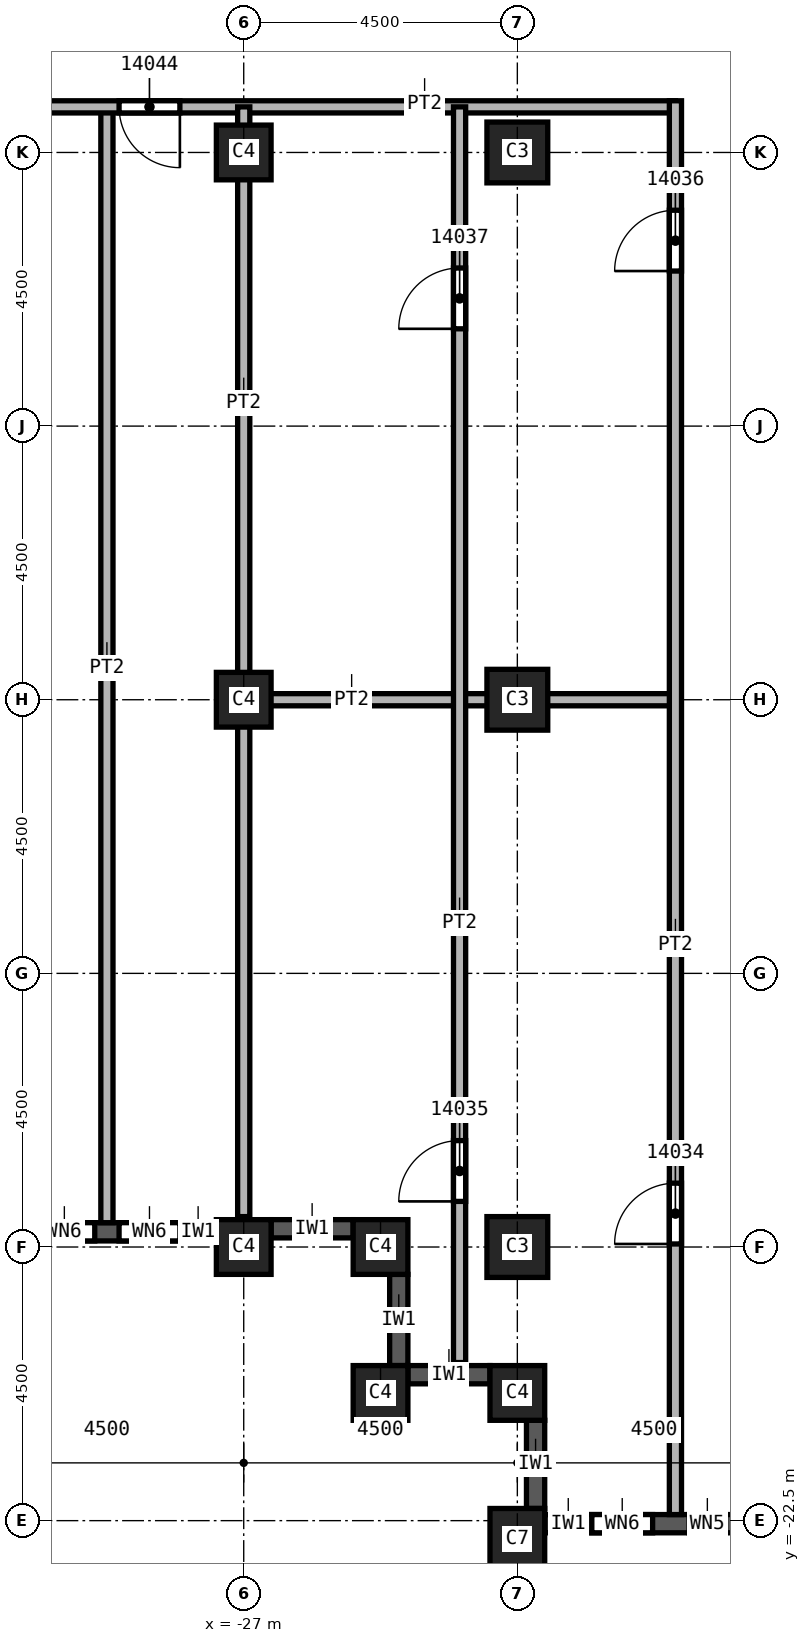
"""IFC4 building model, lengths in metres.
Left out: names, types, materials, properties, quantities, classifications, styles, units other than length and angle.
Written with IfcOpenShell. Run it as: python <this file> out.ifc"""

import sys

from ifc_helpers import new_model, si_unit, direction, frame, frame_2d, origin, origin_2d, place, context, subcontext, project, spatial, rectangle, extrude, element, fill, save


model = new_model("IFC4")
c1 = context("Model", 3, precision=1e-05, world=origin(), true_north=direction((0.0, 1.0)))
c2 = subcontext(c1, "Body", "Model", "MODEL_VIEW")
j1 = project(units=[si_unit("LENGTHUNIT", "METRE"), si_unit("PLANEANGLEUNIT", "RADIAN")], contexts=[c1])
p1 = place(None, origin())
s1 = spatial("IfcSite", under=j1, at=p1, CompositionType="ELEMENT")
p2 = place(p1, origin())
s2 = spatial("IfcBuilding", under=s1, at=p2, CompositionType="ELEMENT")
p3 = place(p2, frame((0.0, 0.0, 220.0)))
s3 = spatial("IfcBuildingStorey", under=s2, at=p3, CompositionType="ELEMENT", Elevation=220.0)
for number, where, z_axis, x_axis in (
    (1, (-22.5, 0.0, 0.0), (0.0, 0.0, 1.0), (1.0, 0.0, 0.0)),
    (2, (-22.5, -9.0, 0.0), (0.0, 0.0, 1.0), (1.0, 0.0, 0.0)),
    (3, (-22.5, -18.0, 0.0), (0.0, 0.0, 1.0), (1.0, 0.0, 0.0)),
):
    element("IfcColumn", number, at=place(p3, frame(where, z_axis=z_axis, x_axis=x_axis)), inside=s3, PredefinedType="COLUMN", context=c2, shape_type="SweptSolid", body=[
        extrude(rectangle(XDim=1.0, YDim=1.0, at=origin_2d()), origin(), (0.0, 0.0, 1.0), 3.72),
    ])
p4 = place(p3, frame((-22.5, -22.8, 0.0), z_axis=(0.0, 0.0, 1.0), x_axis=(1.0, 0.0, 0.0)))
e4 = element("IfcColumn", 4, at=p4, inside=s3, PredefinedType="COLUMN", context=c2, shape_type="SweptSolid", body=[
    extrude(rectangle(XDim=0.9, YDim=1.0, at=origin_2d()), origin(), (0.0, 0.0, 1.0), 3.72),
])
for number, where, z_axis, x_axis in (
    (5, (-27.0, 0.0, 0.0), (0.0, 0.0, 1.0), (1.0, 0.0, 0.0)),
    (6, (-27.0, -9.0, 0.0), (0.0, 0.0, 1.0), (1.0, 0.0, 0.0)),
    (7, (-27.0, -18.0, 0.0), (0.0, 0.0, 1.0), (1.0, 0.0, 0.0)),
    (8, (-22.5, -20.4, 0.0), (0.0, 0.0, 1.0), (1.0, 0.0, 0.0)),
    (9, (-24.75, -20.4, 0.0), (0.0, 0.0, 1.0), (1.0, 0.0, 0.0)),
    (10, (-24.75, -18.0, 0.0), (0.0, 0.0, 1.0), (1.0, 0.0, 0.0)),
):
    element("IfcColumn", number, at=place(p3, frame(where, z_axis=z_axis, x_axis=x_axis)), inside=s3, PredefinedType="COLUMN", context=c2, shape_type="SweptSolid", body=[
        extrude(rectangle(XDim=0.9, YDim=0.9, at=origin_2d()), origin(), (0.0, 0.0, 1.0), 3.72),
    ])
p5 = place(p3, frame((-31.05, -17.75, 0.0), z_axis=(0.0, 0.0, 1.0), x_axis=(1.0, 0.0, 0.0)))
e11 = element("IfcWall", 11, at=p5, inside=s3, PredefinedType="SOLIDWALL", context=c2, shape_type="SweptSolid", body=[
    extrude(rectangle(XDim=3.6, YDim=0.3, at=frame_2d((1.8, 0.0))), origin(), (0.0, 0.0, 1.0), 3.12),
])
p6 = place(p5, frame((0.6, 0.0, 0.8)))
e12 = element("IfcOpeningElement", 12, at=p6, cuts=e11, PredefinedType="OPENING", context=c2, shape_type="SweptSolid", body=[
    extrude(rectangle(XDim=1.0, YDim=1.95, at=frame_2d((0.5, 0.975))), frame((0.0, 0.15, 0.0), z_axis=(0.0, -1.0, 0.0), x_axis=(1.0, 0.0, 0.0)), (0.0, 0.0, 1.0), 0.3),
])
p7 = place(p5, frame((2.0, 0.0, 0.8)))
e13 = element("IfcOpeningElement", 13, at=p7, cuts=e11, PredefinedType="OPENING", context=c2, shape_type="SweptSolid", body=[
    extrude(rectangle(XDim=1.0, YDim=1.95, at=frame_2d((0.5, 0.975))), frame((0.0, 0.15, 0.0), z_axis=(0.0, -1.0, 0.0), x_axis=(1.0, 0.0, 0.0)), (0.0, 0.0, 1.0), 0.3),
])
p8 = place(p3, frame((-26.55, -17.7, 0.0), z_axis=(0.0, 0.0, 1.0), x_axis=(1.0, 0.0, 0.0)))
e14 = element("IfcWall", 14, at=p8, inside=s3, PredefinedType="SOLIDWALL", context=c2, shape_type="SweptSolid", body=[
    extrude(rectangle(XDim=1.35, YDim=0.3, at=frame_2d((0.675, 0.0))), origin(), (0.0, 0.0, 1.0), 3.12),
])
p9 = place(p3, frame((-24.45, -18.45, 0.0), z_axis=(0.0, 0.0, 1.0), x_axis=(0.0, -1.0, 0.0)))
e15 = element("IfcWall", 15, at=p9, inside=s3, PredefinedType="SOLIDWALL", context=c2, shape_type="SweptSolid", body=[
    extrude(rectangle(XDim=1.5, YDim=0.3, at=frame_2d((0.75, 0.0))), origin(), (0.0, 0.0, 1.0), 3.12),
])
p10 = place(p3, frame((-24.3, -20.1, 0.0), z_axis=(0.0, 0.0, 1.0), x_axis=(1.0, 0.0, 0.0)))
e16 = element("IfcWall", 16, at=p10, inside=s3, PredefinedType="SOLIDWALL", context=c2, shape_type="SweptSolid", body=[
    extrude(rectangle(XDim=1.35, YDim=0.3, at=frame_2d((0.675, 0.0))), origin(), (0.0, 0.0, 1.0), 3.12),
])
p11 = place(p3, frame((-22.2, -20.85, 0.0), z_axis=(0.0, 0.0, 1.0), x_axis=(0.0, -1.0, 0.0)))
e17 = element("IfcWall", 17, at=p11, inside=s3, PredefinedType="SOLIDWALL", context=c2, shape_type="SweptSolid", body=[
    extrude(rectangle(XDim=1.45, YDim=0.3, at=frame_2d((0.725, 0.0))), origin(), (0.0, 0.0, 1.0), 3.12),
])
p12 = place(p3, frame((-22.05, -22.55, 0.0), z_axis=(0.0, 0.0, 1.0), x_axis=(1.0, 0.0, 0.0)))
e18 = element("IfcWall", 18, at=p12, inside=s3, PredefinedType="SOLIDWALL", context=c2, shape_type="SweptSolid", body=[
    extrude(rectangle(XDim=3.6, YDim=0.3, at=frame_2d((1.8, 0.0))), origin(), (0.0, 0.0, 1.0), 3.12),
])
p13 = place(p12, frame((0.775, 0.0, 0.8)))
e19 = element("IfcOpeningElement", 19, at=p13, cuts=e18, PredefinedType="OPENING", context=c2, shape_type="SweptSolid", body=[
    extrude(rectangle(XDim=1.0, YDim=1.95, at=frame_2d((0.5, 0.975))), frame((0.0, 0.15, 0.0), z_axis=(0.0, -1.0, 0.0), x_axis=(1.0, 0.0, 0.0)), (0.0, 0.0, 1.0), 0.3),
])
p14 = place(p12, frame((2.375, 0.0, 0.8)))
e20 = element("IfcOpeningElement", 20, at=p14, cuts=e18, PredefinedType="OPENING", context=c2, shape_type="SweptSolid", body=[
    extrude(rectangle(XDim=0.6, YDim=1.95, at=frame_2d((0.3, 0.975))), frame((0.0, 0.15, 0.0), z_axis=(0.0, -1.0, 0.0), x_axis=(1.0, 0.0, 0.0)), (0.0, 0.0, 1.0), 0.3),
])
p15 = place(p3, frame((-29.25, 0.75, 0.0), z_axis=(0.0, 0.0, 1.0), x_axis=(0.0, -1.0, 0.0)))
e21 = element("IfcWall", 21, at=p15, inside=s3, PredefinedType="PARTITIONING", context=c2, shape_type="SweptSolid", body=[
    extrude(rectangle(XDim=18.35, YDim=0.2, at=frame_2d((9.175, 0.0))), origin(), (0.0, 0.0, 1.0), 3.72),
])
p16 = place(p3, frame((-19.9, 0.75, 0.0), z_axis=(0.0, 0.0, 1.0), x_axis=(-1.0, 0.0, 0.0)))
e22 = element("IfcWall", 22, at=p16, inside=s3, PredefinedType="PARTITIONING", context=c2, shape_type="SweptSolid", body=[
    extrude(rectangle(XDim=13.95, YDim=0.2, at=frame_2d((6.975, 0.0))), origin(), (0.0, 0.0, 1.0), 3.72),
])
p17 = place(p16, frame((8.15, 0.0, 0.0)))
e23 = element("IfcOpeningElement", 23, at=p17, cuts=e22, PredefinedType="OPENING", context=c2, shape_type="SweptSolid", body=[
    extrude(rectangle(XDim=1.0, YDim=2.1, at=frame_2d((0.5, 1.05))), frame((0.0, 0.1, 0.0), z_axis=(0.0, -1.0, 0.0), x_axis=(1.0, 0.0, 0.0)), (0.0, 0.0, 1.0), 0.2),
])
p18 = place(p3, frame((-27.1, -9.0, 0.0), z_axis=(0.0, 0.0, 1.0), x_axis=(1.0, 0.0, 0.0)))
e24 = element("IfcWall", 24, at=p18, inside=s3, PredefinedType="PARTITIONING", context=c2, shape_type="SweptSolid", body=[
    extrude(rectangle(XDim=7.2, YDim=0.2, at=frame_2d((3.6, 0.0))), origin(), (0.0, 0.0, 1.0), 3.72),
])
p19 = place(p3, frame((-27.0, -17.5, 0.0), z_axis=(0.0, 0.0, 1.0), x_axis=(0.0, 1.0, 0.0)))
e25 = element("IfcWall", 25, at=p19, inside=s3, PredefinedType="PARTITIONING", context=c2, shape_type="SweptSolid", body=[
    extrude(rectangle(XDim=18.25, YDim=0.2, at=frame_2d((9.125, 0.0))), origin(), (0.0, 0.0, 1.0), 3.72),
])
p20 = place(p3, frame((-23.45, -19.9, 0.0), z_axis=(0.0, 0.0, 1.0), x_axis=(0.0, 1.0, 0.0)))
e26 = element("IfcWall", 26, at=p20, inside=s3, PredefinedType="PARTITIONING", context=c2, shape_type="SweptSolid", body=[
    extrude(rectangle(XDim=20.65, YDim=0.2, at=frame_2d((10.325, 0.0))), origin(), (0.0, 0.0, 1.0), 3.72),
])
p21 = place(p20, frame((2.65, 0.0, 0.0)))
e27 = element("IfcOpeningElement", 27, at=p21, cuts=e26, PredefinedType="OPENING", context=c2, shape_type="SweptSolid", body=[
    extrude(rectangle(XDim=1.0, YDim=2.1, at=frame_2d((0.5, 1.05))), frame((0.0, 0.1, 0.0), z_axis=(0.0, -1.0, 0.0), x_axis=(1.0, 0.0, 0.0)), (0.0, 0.0, 1.0), 0.2),
])
p22 = place(p20, frame((17.0, 0.0, 0.0)))
e28 = element("IfcOpeningElement", 28, at=p22, cuts=e26, PredefinedType="OPENING", context=c2, shape_type="SweptSolid", body=[
    extrude(rectangle(XDim=1.0, YDim=2.1, at=frame_2d((0.5, 1.05))), frame((0.0, 0.1, 0.0), z_axis=(0.0, -1.0, 0.0), x_axis=(1.0, 0.0, 0.0)), (0.0, 0.0, 1.0), 0.2),
])
p23 = place(p3, frame((-19.9, -22.4, 0.0), z_axis=(0.0, 0.0, 1.0), x_axis=(0.0, 1.0, 0.0)))
e29 = element("IfcWall", 29, at=p23, inside=s3, PredefinedType="PARTITIONING", context=c2, shape_type="SweptSolid", body=[
    extrude(rectangle(XDim=23.25, YDim=0.2, at=frame_2d((11.625, 0.0))), origin(), (0.0, 0.0, 1.0), 3.72),
])
p24 = place(p23, frame((4.45, 0.0, 0.0)))
e30 = element("IfcOpeningElement", 30, at=p24, cuts=e29, PredefinedType="OPENING", context=c2, shape_type="SweptSolid", body=[
    extrude(rectangle(XDim=1.0, YDim=2.1, at=frame_2d((0.5, 1.05))), frame((0.0, 0.1, 0.0), z_axis=(0.0, -1.0, 0.0), x_axis=(1.0, 0.0, 0.0)), (0.0, 0.0, 1.0), 0.2),
])
p25 = place(p23, frame((20.45, 0.0, 0.0)))
e31 = element("IfcOpeningElement", 31, at=p25, cuts=e29, PredefinedType="OPENING", context=c2, shape_type="SweptSolid", body=[
    extrude(rectangle(XDim=1.0, YDim=2.1, at=frame_2d((0.5, 1.05))), frame((0.0, 0.1, 0.0), z_axis=(0.0, -1.0, 0.0), x_axis=(1.0, 0.0, 0.0)), (0.0, 0.0, 1.0), 0.2),
])
p26 = place(p24, origin())
e32 = element("IfcDoor", 32, at=p26, inside=s3, OperationType="SINGLE_SWING_LEFT", PredefinedType="DOOR", context=c2, shape_type="SweptSolid", body=[
    extrude(rectangle(XDim=1.0, YDim=2.1, at=frame_2d((0.5, 1.05))), frame((0.0, 0.025, 0.0), z_axis=(0.0, -1.0, 0.0), x_axis=(1.0, 0.0, 0.0)), (0.0, 0.0, 1.0), 0.05),
])
fill(e30, e32)
p27 = place(p21, origin())
e33 = element("IfcDoor", 33, at=p27, inside=s3, OperationType="SINGLE_SWING_RIGHT", PredefinedType="DOOR", context=c2, shape_type="SweptSolid", body=[
    extrude(rectangle(XDim=1.0, YDim=2.1, at=frame_2d((0.5, 1.05))), frame((0.0, 0.025, 0.0), z_axis=(0.0, -1.0, 0.0), x_axis=(1.0, 0.0, 0.0)), (0.0, 0.0, 1.0), 0.05),
])
fill(e27, e33)
p28 = place(p25, origin())
e34 = element("IfcDoor", 34, at=p28, inside=s3, OperationType="SINGLE_SWING_LEFT", PredefinedType="DOOR", context=c2, shape_type="SweptSolid", body=[
    extrude(rectangle(XDim=1.0, YDim=2.1, at=frame_2d((0.5, 1.05))), frame((0.0, 0.025, 0.0), z_axis=(0.0, -1.0, 0.0), x_axis=(1.0, 0.0, 0.0)), (0.0, 0.0, 1.0), 0.05),
])
fill(e31, e34)
p29 = place(p22, origin())
e35 = element("IfcDoor", 35, at=p29, inside=s3, OperationType="SINGLE_SWING_RIGHT", PredefinedType="DOOR", context=c2, shape_type="SweptSolid", body=[
    extrude(rectangle(XDim=1.0, YDim=2.1, at=frame_2d((0.5, 1.05))), frame((0.0, 0.025, 0.0), z_axis=(0.0, -1.0, 0.0), x_axis=(1.0, 0.0, 0.0)), (0.0, 0.0, 1.0), 0.05),
])
fill(e28, e35)
p30 = place(p17, origin())
e36 = element("IfcDoor", 36, at=p30, inside=s3, OperationType="SINGLE_SWING_LEFT", PredefinedType="DOOR", context=c2, shape_type="SweptSolid", body=[
    extrude(rectangle(XDim=1.0, YDim=2.1, at=frame_2d((0.5, 1.05))), frame((0.0, 0.025, 0.0), z_axis=(0.0, -1.0, 0.0), x_axis=(1.0, 0.0, 0.0)), (0.0, 0.0, 1.0), 0.05),
])
fill(e23, e36)
p31 = place(p6, origin())
e37 = element("IfcWindow", 37, at=p31, inside=s3, PartitioningType="SINGLE_PANEL", PredefinedType="WINDOW", context=c2, shape_type="SweptSolid", body=[
    extrude(rectangle(XDim=1.0, YDim=1.95, at=frame_2d((0.5, 0.975))), frame((0.0, 0.03, 0.0), z_axis=(0.0, -1.0, 0.0), x_axis=(1.0, 0.0, 0.0)), (0.0, 0.0, 1.0), 0.06),
])
fill(e12, e37)
p32 = place(p7, origin())
e38 = element("IfcWindow", 38, at=p32, inside=s3, PartitioningType="SINGLE_PANEL", PredefinedType="WINDOW", context=c2, shape_type="SweptSolid", body=[
    extrude(rectangle(XDim=1.0, YDim=1.95, at=frame_2d((0.5, 0.975))), frame((0.0, 0.03, 0.0), z_axis=(0.0, -1.0, 0.0), x_axis=(1.0, 0.0, 0.0)), (0.0, 0.0, 1.0), 0.06),
])
fill(e13, e38)
p33 = place(p13, origin())
e39 = element("IfcWindow", 39, at=p33, inside=s3, PartitioningType="SINGLE_PANEL", PredefinedType="WINDOW", context=c2, shape_type="SweptSolid", body=[
    extrude(rectangle(XDim=1.0, YDim=1.95, at=frame_2d((0.5, 0.975))), frame((0.0, 0.03, 0.0), z_axis=(0.0, -1.0, 0.0), x_axis=(1.0, 0.0, 0.0)), (0.0, 0.0, 1.0), 0.06),
])
fill(e19, e39)
p34 = place(p14, origin())
e40 = element("IfcWindow", 40, at=p34, inside=s3, PartitioningType="SINGLE_PANEL", PredefinedType="WINDOW", context=c2, shape_type="SweptSolid", body=[
    extrude(rectangle(XDim=0.6, YDim=1.95, at=frame_2d((0.3, 0.975))), frame((0.0, 0.03, 0.0), z_axis=(0.0, -1.0, 0.0), x_axis=(1.0, 0.0, 0.0)), (0.0, 0.0, 1.0), 0.06),
])
fill(e20, e40)
save(model, sys.argv[1])
